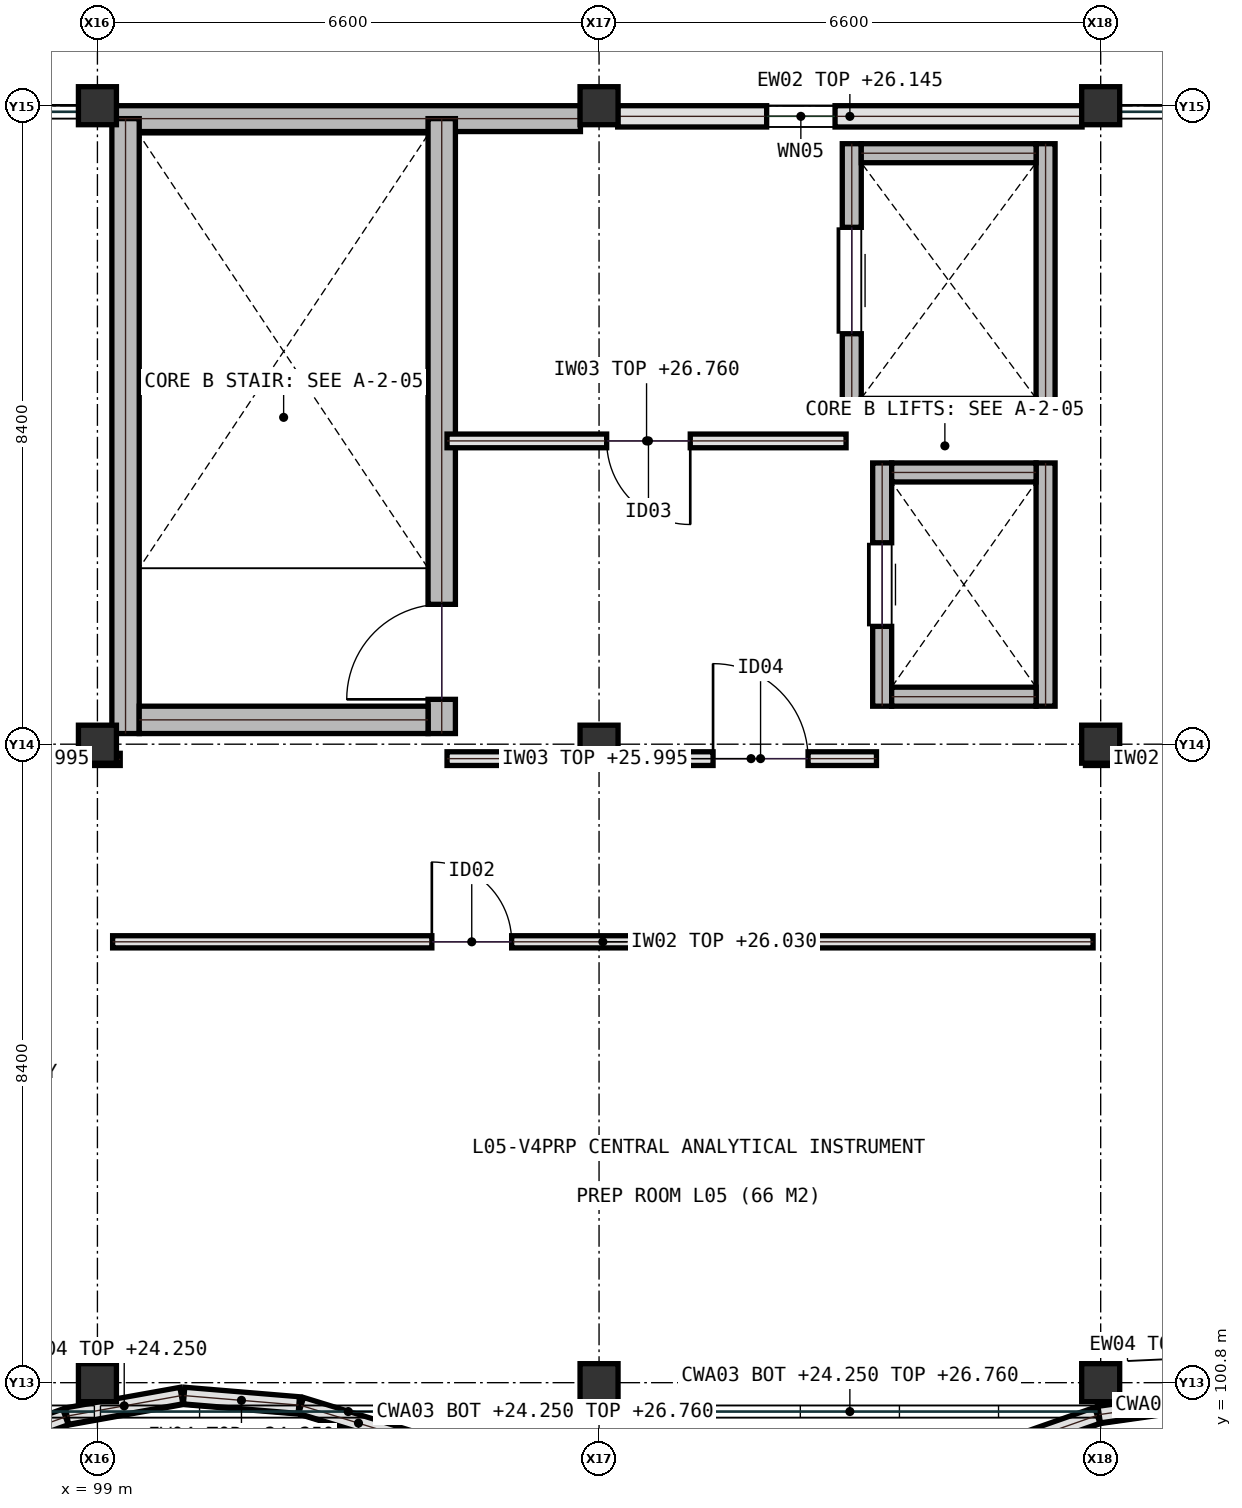
"""IFC4 building model, lengths in metres.
Left out: names, types, materials, properties, quantities, classifications, styles, units other than length and angle.
Written with IfcOpenShell. Run it as: python <this file> out.ifc"""

import sys

from ifc_helpers import new_model, si_unit, direction, frame, frame_2d, origin, origin_2d, place, context, subcontext, project, spatial, rectangle, extrude, element, fill, save


model = new_model("IFC4")
c1 = context("Model", 3, precision=1e-05, world=origin(), true_north=direction((0.0, 1.0)))
c2 = subcontext(c1, "Body", "Model", "MODEL_VIEW")
j1 = project(units=[si_unit("LENGTHUNIT", "METRE"), si_unit("PLANEANGLEUNIT", "RADIAN")], contexts=[c1])
p1 = place(None, origin())
s1 = spatial("IfcSite", under=j1, at=p1, CompositionType="ELEMENT")
p2 = place(p1, origin())
s2 = spatial("IfcBuilding", under=s1, at=p2, CompositionType="ELEMENT")
p3 = place(p2, frame((0.0, 0.0, 22.8)))
s3 = spatial("IfcBuildingStorey", under=s2, at=p3, CompositionType="ELEMENT", Elevation=22.8)
for number, where, z_axis, x_axis in (
    (1, (99.0, 100.8, 0.0), (0.0, 0.0, 1.0), (1.0, 0.0, 0.0)),
    (2, (99.0, 109.2, 0.0), (0.0, 0.0, 1.0), (1.0, 0.0, 0.0)),
    (3, (99.0, 117.6, 0.0), (0.0, 0.0, 1.0), (1.0, 0.0, 0.0)),
    (4, (105.6, 100.8, 0.0), (0.0, 0.0, 1.0), (1.0, 0.0, 0.0)),
    (5, (105.6, 109.2, 0.0), (0.0, 0.0, 1.0), (1.0, 0.0, 0.0)),
    (6, (105.6, 117.6, 0.0), (0.0, 0.0, 1.0), (1.0, 0.0, 0.0)),
    (7, (112.2, 100.8, 0.0), (0.0, 0.0, 1.0), (1.0, 0.0, 0.0)),
    (8, (112.2, 109.2, 0.0), (0.0, 0.0, 1.0), (1.0, 0.0, 0.0)),
    (9, (112.2, 117.6, 0.0), (0.0, 0.0, 1.0), (1.0, 0.0, 0.0)),
):
    element("IfcColumn", number, at=place(p3, frame(where, z_axis=z_axis, x_axis=x_axis)), inside=s3, PredefinedType="COLUMN", context=c2, shape_type="SweptSolid", body=[
        extrude(rectangle(XDim=0.5, YDim=0.5, at=origin_2d()), origin(), (0.0, 0.0, 1.0), 4.2),
    ])
p4 = place(p3, frame((92.85, 109.0, 0.0), z_axis=(0.0, 0.0, 1.0), x_axis=(1.0, 0.0, 0.0)))
e10 = element("IfcWall", 10, at=p4, inside=s3, PredefinedType="PARTITIONING", context=c2, shape_type="SweptSolid", body=[
    extrude(rectangle(XDim=6.45, YDim=0.16, at=frame_2d((3.225, 0.0))), origin(), (0.0, 0.0, 1.0), 3.195),
])
p5 = place(p4, frame((0.83, 0.0, 0.0)))
e11 = element("IfcOpeningElement", 11, at=p5, cuts=e10, PredefinedType="OPENING", context=c2, shape_type="SweptSolid", body=[
    extrude(rectangle(XDim=1.45, YDim=2.25, at=frame_2d((0.725, 1.125))), frame((0.0, 0.09, 0.0), z_axis=(0.0, -1.0, 0.0), x_axis=(1.0, 0.0, 0.0)), (0.0, 0.0, 1.0), 0.18),
])
p6 = place(p3, frame((112.0, 109.0, 0.0), z_axis=(0.0, 0.0, 1.0), x_axis=(1.0, 0.0, 0.0)))
e12 = element("IfcWall", 12, at=p6, inside=s3, PredefinedType="PARTITIONING", context=c2, shape_type="SweptSolid", body=[
    extrude(rectangle(XDim=6.35, YDim=0.16, at=frame_2d((3.175, 0.0))), origin(), (0.0, 0.0, 1.0), 3.195),
])
p7 = place(p6, frame((4.05, 0.0, 0.0)))
e13 = element("IfcOpeningElement", 13, at=p7, cuts=e12, PredefinedType="OPENING", context=c2, shape_type="SweptSolid", body=[
    extrude(rectangle(XDim=1.95, YDim=2.35, at=frame_2d((0.975, 1.175))), frame((0.0, 0.09, 0.0), z_axis=(0.0, -1.0, 0.0), x_axis=(1.0, 0.0, 0.0)), (0.0, 0.0, 1.0), 0.18),
])
p8 = place(p3, frame((99.2, 106.6, 0.0), z_axis=(0.0, 0.0, 1.0), x_axis=(1.0, 0.0, 0.0)))
e14 = element("IfcWall", 14, at=p8, inside=s3, PredefinedType="PARTITIONING", context=c2, shape_type="SweptSolid", body=[
    extrude(rectangle(XDim=12.9, YDim=0.16, at=frame_2d((6.45, 0.0))), origin(), (0.0, 0.0, 1.0), 3.23),
])
p9 = place(p8, frame((4.2, 0.0, 0.0)))
e15 = element("IfcOpeningElement", 15, at=p9, cuts=e14, PredefinedType="OPENING", context=c2, shape_type="SweptSolid", body=[
    extrude(rectangle(XDim=1.05, YDim=2.15, at=frame_2d((0.525, 1.075))), frame((0.0, 0.09, 0.0), z_axis=(0.0, -1.0, 0.0), x_axis=(1.0, 0.0, 0.0)), (0.0, 0.0, 1.0), 0.18),
])
p10 = place(p3, frame((105.355, 117.43, 0.0), z_axis=(0.0, 0.0, 1.0), x_axis=(-1.0, 0.0, 0.0)))
e16 = element("IfcWall", 16, at=p10, inside=s3, PredefinedType="SHEAR", context=c2, shape_type="SweptSolid", body=[
    extrude(rectangle(XDim=6.11, YDim=0.34, at=frame_2d((3.055, 0.0))), origin(), (0.0, 0.0, 1.0), 3.98),
])
p11 = place(p3, frame((111.955, 117.46, 0.0), z_axis=(0.0, 0.0, 1.0), x_axis=(-1.0, 0.0, 0.0)))
e17 = element("IfcWall", 17, at=p11, inside=s3, PredefinedType="SOLIDWALL", context=c2, shape_type="SweptSolid", body=[
    extrude(rectangle(XDim=6.11, YDim=0.28, at=frame_2d((3.055, 0.0))), origin(), (0.0, 0.0, 1.0), 3.345),
])
p12 = place(p11, frame((3.25, 0.0, 0.95)))
e18 = element("IfcOpeningElement", 18, at=p12, cuts=e17, PredefinedType="OPENING", context=c2, shape_type="SweptSolid", body=[
    extrude(rectangle(XDim=0.9, YDim=1.4, at=frame_2d((0.45, 0.7))), frame((0.0, 0.15, 0.0), z_axis=(0.0, -1.0, 0.0), x_axis=(1.0, 0.0, 0.0)), (0.0, 0.0, 1.0), 0.3),
])
p13 = place(p3, frame((97.07, 99.81, 0.0), z_axis=(0.0, 0.0, 1.0), x_axis=(0.941593715183, 0.336751058688, 0.0)))
e19 = element("IfcWall", 19, at=p13, inside=s3, PredefinedType="SOLIDWALL", context=c2, shape_type="SweptSolid", body=[
    extrude(rectangle(XDim=1.604, YDim=0.22, at=frame_2d((0.802, 0.0))), origin(), (0.0, 0.0, 1.0), 1.45),
])
p14 = place(p3, frame((98.6, 100.36, 0.0), z_axis=(0.0, 0.0, 1.0), x_axis=(0.984308919427, 0.176453821539, 0.0)))
e20 = element("IfcWall", 20, at=p14, inside=s3, PredefinedType="SOLIDWALL", context=c2, shape_type="SweptSolid", body=[
    extrude(rectangle(XDim=1.529, YDim=0.22, at=frame_2d((0.764, 0.0))), origin(), (0.0, 0.0, 1.0), 1.45),
])
p15 = place(p3, frame((100.14, 100.63, 0.0), z_axis=(0.0, 0.0, 1.0), x_axis=(0.996591169262, -0.082498735434, 0.0)))
e21 = element("IfcWall", 21, at=p15, inside=s3, PredefinedType="SOLIDWALL", context=c2, shape_type="SweptSolid", body=[
    extrude(rectangle(XDim=1.515, YDim=0.22, at=frame_2d((0.758, 0.0))), origin(), (0.0, 0.0, 1.0), 1.45),
])
p16 = place(p3, frame((101.68, 100.5, 0.0), z_axis=(0.0, 0.0, 1.0), x_axis=(0.95569544679, -0.294357287977, 0.0)))
e22 = element("IfcWall", 22, at=p16, inside=s3, PredefinedType="SOLIDWALL", context=c2, shape_type="SweptSolid", body=[
    extrude(rectangle(XDim=1.58, YDim=0.22, at=frame_2d((0.79, 0.0))), origin(), (0.0, 0.0, 1.0), 1.45),
])
p17 = place(p3, frame((110.645, 99.84, 0.0), z_axis=(0.0, 0.0, 1.0), x_axis=(0.943560676249, 0.331199713522, 0.0)))
e23 = element("IfcWall", 23, at=p17, inside=s3, PredefinedType="SOLIDWALL", context=c2, shape_type="SweptSolid", body=[
    extrude(rectangle(XDim=1.6, YDim=0.22, at=frame_2d((0.8, 0.0))), origin(), (0.0, 0.0, 1.0), 1.45),
])
p18 = place(p3, frame((112.18, 100.38, 0.0), z_axis=(0.0, 0.0, 1.0), x_axis=(0.990109991905, 0.140293278275, 0.0)))
e24 = element("IfcWall", 24, at=p18, inside=s3, PredefinedType="SOLIDWALL", context=c2, shape_type="SweptSolid", body=[
    extrude(rectangle(XDim=2.424, YDim=0.22, at=frame_2d((1.212, 0.0))), origin(), (0.0, 0.0, 1.0), 1.45),
])
p19 = place(p3, frame((99.37, 109.34, 0.0), z_axis=(0.0, 0.0, 1.0), x_axis=(0.0, 1.0, 0.0)))
e25 = element("IfcWall", 25, at=p19, inside=s3, PredefinedType="SHEAR", context=c2, shape_type="SweptSolid", body=[
    extrude(rectangle(XDim=8.09, YDim=0.36, at=frame_2d((4.045, 0.0))), origin(), (0.0, 0.0, 1.0), 3.96),
])
p20 = place(p3, frame((103.53, 109.34, 0.0), z_axis=(0.0, 0.0, 1.0), x_axis=(0.0, 1.0, 0.0)))
e26 = element("IfcWall", 26, at=p20, inside=s3, PredefinedType="SHEAR", context=c2, shape_type="SweptSolid", body=[
    extrude(rectangle(XDim=8.09, YDim=0.36, at=frame_2d((4.045, 0.0))), origin(), (0.0, 0.0, 1.0), 3.96),
])
p21 = place(p20, frame((0.45, 0.0, 0.0)))
e27 = element("IfcOpeningElement", 27, at=p21, cuts=e26, PredefinedType="OPENING", context=c2, shape_type="SweptSolid", body=[
    extrude(rectangle(XDim=1.25, YDim=2.15, at=frame_2d((0.625, 1.075))), frame((0.0, 0.19, 0.0), z_axis=(0.0, -1.0, 0.0), x_axis=(1.0, 0.0, 0.0)), (0.0, 0.0, 1.0), 0.38),
])
p22 = place(p3, frame((99.55, 109.52, 0.0), z_axis=(0.0, 0.0, 1.0), x_axis=(1.0, 0.0, 0.0)))
e28 = element("IfcWall", 28, at=p22, inside=s3, PredefinedType="SHEAR", context=c2, shape_type="SweptSolid", body=[
    extrude(rectangle(XDim=3.8, YDim=0.36, at=frame_2d((1.9, 0.0))), origin(), (0.0, 0.0, 1.0), 3.96),
])
p23 = place(p3, frame((109.325, 109.7, 0.0), z_axis=(0.0, 0.0, 1.0), x_axis=(0.0, 1.0, 0.0)))
e29 = element("IfcWall", 29, at=p23, inside=s3, PredefinedType="SHEAR", context=c2, shape_type="SweptSolid", body=[
    extrude(rectangle(XDim=3.2, YDim=0.25, at=frame_2d((1.6, 0.0))), origin(), (0.0, 0.0, 1.0), 3.96),
])
p24 = place(p23, frame((1.05, 0.0, 0.0)))
e30 = element("IfcOpeningElement", 30, at=p24, cuts=e29, PredefinedType="OPENING", context=c2, shape_type="SweptSolid", body=[
    extrude(rectangle(XDim=1.1, YDim=2.15, at=frame_2d((0.55, 1.075))), frame((0.0, 0.135, 0.0), z_axis=(0.0, -1.0, 0.0), x_axis=(1.0, 0.0, 0.0)), (0.0, 0.0, 1.0), 0.27),
])
p25 = place(p3, frame((111.475, 109.7, 0.0), z_axis=(0.0, 0.0, 1.0), x_axis=(0.0, 1.0, 0.0)))
e31 = element("IfcWall", 31, at=p25, inside=s3, PredefinedType="SHEAR", context=c2, shape_type="SweptSolid", body=[
    extrude(rectangle(XDim=3.2, YDim=0.25, at=frame_2d((1.6, 0.0))), origin(), (0.0, 0.0, 1.0), 3.96),
])
for number, where, z_axis, x_axis in (
    (32, (109.45, 109.825, 0.0), (0.0, 0.0, 1.0), (1.0, 0.0, 0.0)),
    (33, (109.45, 112.775, 0.0), (0.0, 0.0, 1.0), (1.0, 0.0, 0.0)),
):
    element("IfcWall", number, at=place(p3, frame(where, z_axis=z_axis, x_axis=x_axis)), inside=s3, PredefinedType="SHEAR", context=c2, shape_type="SweptSolid", body=[
        extrude(rectangle(XDim=1.9, YDim=0.25, at=frame_2d((0.95, 0.0))), origin(), (0.0, 0.0, 1.0), 3.96),
    ])
p26 = place(p3, frame((108.925, 113.5, 0.0), z_axis=(0.0, 0.0, 1.0), x_axis=(0.0, 1.0, 0.0)))
e34 = element("IfcWall", 34, at=p26, inside=s3, PredefinedType="SHEAR", context=c2, shape_type="SweptSolid", body=[
    extrude(rectangle(XDim=3.6, YDim=0.25, at=frame_2d((1.8, 0.0))), origin(), (0.0, 0.0, 1.0), 3.96),
])
p27 = place(p26, frame((1.1, 0.0, 0.0)))
e35 = element("IfcOpeningElement", 35, at=p27, cuts=e34, PredefinedType="OPENING", context=c2, shape_type="SweptSolid", body=[
    extrude(rectangle(XDim=1.4, YDim=2.2, at=frame_2d((0.7, 1.1))), frame((0.0, 0.135, 0.0), z_axis=(0.0, -1.0, 0.0), x_axis=(1.0, 0.0, 0.0)), (0.0, 0.0, 1.0), 0.27),
])
p28 = place(p3, frame((111.475, 113.5, 0.0), z_axis=(0.0, 0.0, 1.0), x_axis=(0.0, 1.0, 0.0)))
e36 = element("IfcWall", 36, at=p28, inside=s3, PredefinedType="SHEAR", context=c2, shape_type="SweptSolid", body=[
    extrude(rectangle(XDim=3.6, YDim=0.25, at=frame_2d((1.8, 0.0))), origin(), (0.0, 0.0, 1.0), 3.96),
])
for number, where, z_axis, x_axis in (
    (37, (109.05, 113.625, 0.0), (0.0, 0.0, 1.0), (1.0, 0.0, 0.0)),
    (38, (109.05, 116.975, 0.0), (0.0, 0.0, 1.0), (1.0, 0.0, 0.0)),
):
    element("IfcWall", number, at=place(p3, frame(where, z_axis=z_axis, x_axis=x_axis)), inside=s3, PredefinedType="SHEAR", context=c2, shape_type="SweptSolid", body=[
        extrude(rectangle(XDim=2.3, YDim=0.25, at=frame_2d((1.15, 0.0))), origin(), (0.0, 0.0, 1.0), 3.96),
    ])
p29 = place(p3, frame((103.6, 109.01, 0.0), z_axis=(0.0, 0.0, 1.0), x_axis=(1.0, 0.0, 0.0)))
e39 = element("IfcWall", 39, at=p29, inside=s3, PredefinedType="SOLIDWALL", context=c2, shape_type="SweptSolid", body=[
    extrude(rectangle(XDim=1.65, YDim=0.18, at=frame_2d((0.825, 0.0))), origin(), (0.0, 0.0, 1.0), 3.195),
])
p30 = place(p3, frame((105.95, 109.01, 0.0), z_axis=(0.0, 0.0, 1.0), x_axis=(1.0, 0.0, 0.0)))
e40 = element("IfcWall", 40, at=p30, inside=s3, PredefinedType="SOLIDWALL", context=c2, shape_type="SweptSolid", body=[
    extrude(rectangle(XDim=3.3, YDim=0.18, at=frame_2d((1.65, 0.0))), origin(), (0.0, 0.0, 1.0), 3.195),
])
p31 = place(p30, frame((1.15, 0.0, 0.0)))
e41 = element("IfcOpeningElement", 41, at=p31, cuts=e40, PredefinedType="OPENING", context=c2, shape_type="SweptSolid", body=[
    extrude(rectangle(XDim=1.25, YDim=2.15, at=frame_2d((0.625, 1.075))), frame((0.0, 0.1, 0.0), z_axis=(0.0, -1.0, 0.0), x_axis=(1.0, 0.0, 0.0)), (0.0, 0.0, 1.0), 0.2),
])
p32 = place(p3, frame((103.6, 113.19, 0.0), z_axis=(0.0, 0.0, 1.0), x_axis=(1.0, 0.0, 0.0)))
e42 = element("IfcWall", 42, at=p32, inside=s3, PredefinedType="SOLIDWALL", context=c2, shape_type="SweptSolid", body=[
    extrude(rectangle(XDim=5.25, YDim=0.18, at=frame_2d((2.625, 0.0))), origin(), (0.0, 0.0, 1.0), 3.96),
])
p33 = place(p32, frame((2.1, 0.0, 0.0)))
e43 = element("IfcOpeningElement", 43, at=p33, cuts=e42, PredefinedType="OPENING", context=c2, shape_type="SweptSolid", body=[
    extrude(rectangle(XDim=1.1, YDim=2.15, at=frame_2d((0.55, 1.075))), frame((0.0, 0.1, 0.0), z_axis=(0.0, -1.0, 0.0), x_axis=(1.0, 0.0, 0.0)), (0.0, 0.0, 1.0), 0.2),
])
p34 = place(p9, origin())
e44 = element("IfcDoor", 44, at=p34, inside=s3, OperationType="SINGLE_SWING_LEFT", PredefinedType="DOOR", context=c2, shape_type="SweptSolid", body=[
    extrude(rectangle(XDim=1.05, YDim=2.15, at=frame_2d((0.525, 1.075))), frame((0.0, 0.025, 0.0), z_axis=(0.0, -1.0, 0.0), x_axis=(1.0, 0.0, 0.0)), (0.0, 0.0, 1.0), 0.05),
])
fill(e15, e44)
p35 = place(p12, origin())
e45 = element("IfcWindow", 45, at=p35, inside=s3, PartitioningType="SINGLE_PANEL", PredefinedType="WINDOW", context=c2, shape_type="SweptSolid", body=[
    extrude(rectangle(XDim=0.9, YDim=1.4, at=frame_2d((0.45, 0.7))), frame((0.0, 0.03, 0.0), z_axis=(0.0, -1.0, 0.0), x_axis=(1.0, 0.0, 0.0)), (0.0, 0.0, 1.0), 0.06),
])
fill(e18, e45)
p36 = place(p21, origin())
e46 = element("IfcDoor", 46, at=p36, inside=s3, OperationType="SINGLE_SWING_LEFT", PredefinedType="DOOR", context=c2, shape_type="SweptSolid", body=[
    extrude(rectangle(XDim=1.25, YDim=2.15, at=frame_2d((0.625, 1.075))), frame((0.0, 0.025, 0.0), z_axis=(0.0, -1.0, 0.0), x_axis=(1.0, 0.0, 0.0)), (0.0, 0.0, 1.0), 0.05),
])
fill(e27, e46)
p37 = place(p24, origin())
e47 = element("IfcDoor", 47, at=p37, inside=s3, OperationType="SLIDING_TO_LEFT", PredefinedType="DOOR", context=c2, shape_type="SweptSolid", body=[
    extrude(rectangle(XDim=1.1, YDim=2.15, at=frame_2d((0.55, 1.075))), frame((0.0, 0.025, 0.0), z_axis=(0.0, -1.0, 0.0), x_axis=(1.0, 0.0, 0.0)), (0.0, 0.0, 1.0), 0.05),
])
fill(e30, e47)
p38 = place(p27, origin())
e48 = element("IfcDoor", 48, at=p38, inside=s3, OperationType="SLIDING_TO_LEFT", PredefinedType="DOOR", context=c2, shape_type="SweptSolid", body=[
    extrude(rectangle(XDim=1.4, YDim=2.2, at=frame_2d((0.7, 1.1))), frame((0.0, 0.025, 0.0), z_axis=(0.0, -1.0, 0.0), x_axis=(1.0, 0.0, 0.0)), (0.0, 0.0, 1.0), 0.05),
])
fill(e35, e48)
p39 = place(p31, origin())
e49 = element("IfcDoor", 49, at=p39, inside=s3, OperationType="SINGLE_SWING_LEFT", PredefinedType="DOOR", context=c2, shape_type="SweptSolid", body=[
    extrude(rectangle(XDim=1.25, YDim=2.15, at=frame_2d((0.625, 1.075))), frame((0.0, 0.025, 0.0), z_axis=(0.0, -1.0, 0.0), x_axis=(1.0, 0.0, 0.0)), (0.0, 0.0, 1.0), 0.05),
])
fill(e41, e49)
p40 = place(p33, frame((1.1, 0.0, 0.0), z_axis=(0.0, 0.0, 1.0), x_axis=(-1.0, 0.0, 0.0)))
e50 = element("IfcDoor", 50, at=p40, inside=s3, OperationType="SINGLE_SWING_RIGHT", PredefinedType="DOOR", context=c2, shape_type="SweptSolid", body=[
    extrude(rectangle(XDim=1.1, YDim=2.15, at=frame_2d((0.55, 1.075))), frame((0.0, 0.025, 0.0), z_axis=(0.0, -1.0, 0.0), x_axis=(1.0, 0.0, 0.0)), (0.0, 0.0, 1.0), 0.05),
])
fill(e43, e50)
save(model, sys.argv[1])
